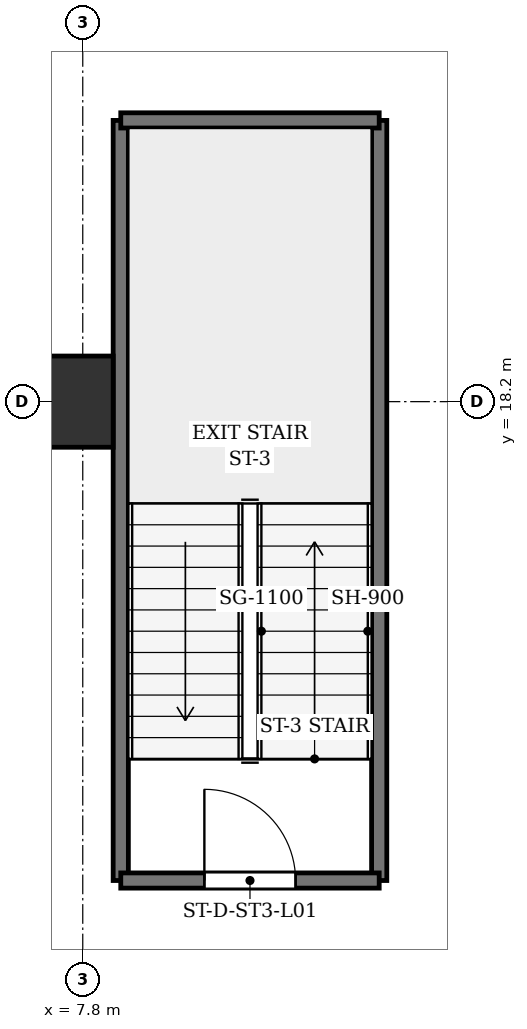
"""IFC4 building model, lengths in metres.
Left out: names, types, materials, properties, quantities, classifications, styles, units other than length and angle.
Written with IfcOpenShell. Run it as: python <this file> out.ifc"""

import sys

from ifc_helpers import new_model, si_unit, direction, frame, frame_2d, origin, origin_2d, place, context, subcontext, project, spatial, rectangle, extrude, source, transform, mapped, element, fill, save


model = new_model("IFC4")
c1 = context("Model", 3, precision=1e-05, world=origin(), true_north=direction((0.0, 1.0)))
c2 = subcontext(c1, "Body", "Model", "MODEL_VIEW")
j1 = project(units=[si_unit("LENGTHUNIT", "METRE"), si_unit("PLANEANGLEUNIT", "RADIAN")], contexts=[c1])
p1 = place(None, origin())
s1 = spatial("IfcSite", under=j1, at=p1, CompositionType="ELEMENT")
p2 = place(p1, origin())
s2 = spatial("IfcBuilding", under=s1, at=p2, CompositionType="ELEMENT")
p3 = place(p2, frame((0.0, 0.0, 5.2)))
s3 = spatial("IfcBuildingStorey", under=s2, at=p3, CompositionType="ELEMENT", Elevation=5.2)
m1 = source(origin(), c2, "Body", "SweptSolid", [
    extrude(rectangle(XDim=1.2, YDim=1.2, at=origin_2d()), origin(), (0.0, 0.0, 1.0), 4.5),
])
p4 = place(p3, frame((7.6, 18.2, 0.0), z_axis=(0.0, 0.0, 1.0), x_axis=(1.0, 0.0, 0.0)))
e1 = element("IfcColumn", 1, at=p4, inside=s3, PredefinedType="COLUMN", context=c2, shape_type="MappedRepresentation", body=[
    mapped(m1, transform((0.0, 0.0, 0.0), x_axis=(1.0, 0.0, 0.0), y_axis=(0.0, 1.0, 0.0), z_axis=(0.0, 0.0, 1.0), scale=1.0)),
])
for number, where, z_axis, x_axis in (
    (2, (8.3, 11.9, 0.0), (0.0, 0.0, 1.0), (0.0, 1.0, 0.0)),
    (3, (11.7, 11.9, 0.0), (0.0, 0.0, 1.0), (0.0, 1.0, 0.0)),
):
    element("IfcWall", number, at=place(p3, frame(where, z_axis=z_axis, x_axis=x_axis)), inside=s3, PredefinedType="SHEAR", context=c2, shape_type="SweptSolid", body=[
        extrude(rectangle(XDim=10.0, YDim=0.2, at=frame_2d((5.0, 0.0))), origin(), (0.0, 0.0, 1.0), 4.2),
    ])
p5 = place(p3, frame((8.3, 11.9, 0.0), z_axis=(0.0, 0.0, 1.0), x_axis=(1.0, 0.0, 0.0)))
e4 = element("IfcWall", 4, at=p5, inside=s3, PredefinedType="SHEAR", context=c2, shape_type="SweptSolid", body=[
    extrude(rectangle(XDim=3.4, YDim=0.2, at=frame_2d((1.7, 0.0))), origin(), (0.0, 0.0, 1.0), 4.2),
])
p6 = place(p5, frame((1.1, 0.0, 0.0)))
e5 = element("IfcOpeningElement", 5, at=p6, cuts=e4, PredefinedType="OPENING", context=c2, shape_type="SweptSolid", body=[
    extrude(rectangle(XDim=1.2, YDim=2.15, at=frame_2d((0.6, 1.075))), frame((0.0, 0.11, 0.0), z_axis=(0.0, -1.0, 0.0), x_axis=(1.0, 0.0, 0.0)), (0.0, 0.0, 1.0), 0.22),
])
p7 = place(p3, frame((8.3, 21.9, 0.0), z_axis=(0.0, 0.0, 1.0), x_axis=(1.0, 0.0, 0.0)))
e6 = element("IfcWall", 6, at=p7, inside=s3, PredefinedType="SHEAR", context=c2, shape_type="SweptSolid", body=[
    extrude(rectangle(XDim=3.4, YDim=0.2, at=frame_2d((1.7, 0.0))), origin(), (0.0, 0.0, 1.0), 4.2),
])
m2 = source(origin(), c2, "Body", "SweptSolid", [
    extrude(rectangle(XDim=1.2, YDim=2.15, at=frame_2d((0.6, 1.075))), frame((0.0, 0.025, 0.0), z_axis=(0.0, -1.0, 0.0), x_axis=(1.0, 0.0, 0.0)), (0.0, 0.0, 1.0), 0.05),
])
p8 = place(p6, origin())
e7 = element("IfcDoor", 7, at=p8, inside=s3, OperationType="SINGLE_SWING_LEFT", PredefinedType="DOOR", context=c2, shape_type="MappedRepresentation", body=[
    mapped(m2, transform((0.0, 0.0, 0.0), x_axis=(1.0, 0.0, 0.0), y_axis=(0.0, 1.0, 0.0), z_axis=(0.0, 0.0, 1.0), scale=1.0)),
])
fill(e5, e7)
save(model, sys.argv[1])
